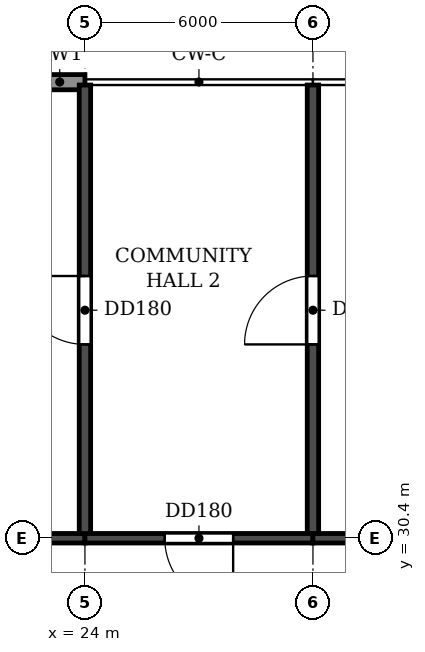
"""IFC4 building model, lengths in metres.
Left out: names, types, materials, properties, quantities, classifications, styles, units other than length and angle.
Written with IfcOpenShell. Run it as: python <this file> out.ifc"""

import sys

from ifc_helpers import new_model, si_unit, direction, frame, frame_2d, origin, place, context, subcontext, project, spatial, rectangle, extrude, element, fill, save


model = new_model("IFC4")
c1 = context("Model", 3, precision=1e-05, world=origin(), true_north=direction((0.0, 1.0)))
c2 = subcontext(c1, "Body", "Model", "MODEL_VIEW")
j1 = project(units=[si_unit("LENGTHUNIT", "METRE"), si_unit("PLANEANGLEUNIT", "RADIAN")], contexts=[c1])
p1 = place(None, origin())
s1 = spatial("IfcSite", under=j1, at=p1, CompositionType="ELEMENT")
p2 = place(p1, origin())
s2 = spatial("IfcBuilding", under=s1, at=p2, CompositionType="ELEMENT")
p3 = place(p2, frame((0.0, 0.0, 158.7)))
s3 = spatial("IfcBuildingStorey", under=s2, at=p3, CompositionType="ELEMENT", Elevation=158.7)
p4 = place(p3, frame((24.0, 30.525, 0.0), z_axis=(0.0, 0.0, 1.0), x_axis=(0.0, 1.0, 0.0)))
e1 = element("IfcWall", 1, at=p4, inside=s3, PredefinedType="SHEAR", context=c2, shape_type="SweptSolid", body=[
    extrude(rectangle(XDim=11.8, YDim=0.3, at=frame_2d((5.9, 0.0))), origin(), (0.0, 0.0, 1.0), 3.07),
])
p5 = place(p4, frame((4.975, 0.0, 0.0)))
e2 = element("IfcOpeningElement", 2, at=p5, cuts=e1, PredefinedType="OPENING", context=c2, shape_type="SweptSolid", body=[
    extrude(rectangle(XDim=1.8, YDim=2.1, at=frame_2d((0.9, 1.05))), frame((0.0, 0.16, 0.0), z_axis=(0.0, -1.0, 0.0), x_axis=(1.0, 0.0, 0.0)), (0.0, 0.0, 1.0), 0.32),
])
p6 = place(p3, frame((30.0, 30.525, 0.0), z_axis=(0.0, 0.0, 1.0), x_axis=(0.0, 1.0, 0.0)))
e3 = element("IfcWall", 3, at=p6, inside=s3, PredefinedType="SHEAR", context=c2, shape_type="SweptSolid", body=[
    extrude(rectangle(XDim=11.8, YDim=0.3, at=frame_2d((5.9, 0.0))), origin(), (0.0, 0.0, 1.0), 3.07),
])
p7 = place(p6, frame((4.975, 0.0, 0.0)))
e4 = element("IfcOpeningElement", 4, at=p7, cuts=e3, PredefinedType="OPENING", context=c2, shape_type="SweptSolid", body=[
    extrude(rectangle(XDim=1.8, YDim=2.1, at=frame_2d((0.9, 1.05))), frame((0.0, 0.16, 0.0), z_axis=(0.0, -1.0, 0.0), x_axis=(1.0, 0.0, 0.0)), (0.0, 0.0, 1.0), 0.32),
])
p8 = place(p3, frame((18.2, 30.4, 0.0), z_axis=(0.0, 0.0, 1.0), x_axis=(1.0, 0.0, 0.0)))
e5 = element("IfcWall", 5, at=p8, inside=s3, PredefinedType="SHEAR", context=c2, shape_type="SweptSolid", body=[
    extrude(rectangle(XDim=5.8, YDim=0.25, at=frame_2d((2.9, 0.0))), origin(), (0.0, 0.0, 1.0), 2.47),
])
p9 = place(p8, frame((1.9, 0.0, 0.0)))
e6 = element("IfcOpeningElement", 6, at=p9, cuts=e5, PredefinedType="OPENING", context=c2, shape_type="SweptSolid", body=[
    extrude(rectangle(XDim=1.8, YDim=2.1, at=frame_2d((0.9, 1.05))), frame((0.0, 0.135, 0.0), z_axis=(0.0, -1.0, 0.0), x_axis=(1.0, 0.0, 0.0)), (0.0, 0.0, 1.0), 0.27),
])
p10 = place(p3, frame((24.0, 30.4, 0.0), z_axis=(0.0, 0.0, 1.0), x_axis=(1.0, 0.0, 0.0)))
e7 = element("IfcWall", 7, at=p10, inside=s3, PredefinedType="SHEAR", context=c2, shape_type="SweptSolid", body=[
    extrude(rectangle(XDim=6.0, YDim=0.25, at=frame_2d((3.0, 0.0))), origin(), (0.0, 0.0, 1.0), 2.47),
])
p11 = place(p10, frame((2.1, 0.0, 0.0)))
e8 = element("IfcOpeningElement", 8, at=p11, cuts=e7, PredefinedType="OPENING", context=c2, shape_type="SweptSolid", body=[
    extrude(rectangle(XDim=1.8, YDim=2.1, at=frame_2d((0.9, 1.05))), frame((0.0, 0.135, 0.0), z_axis=(0.0, -1.0, 0.0), x_axis=(1.0, 0.0, 0.0)), (0.0, 0.0, 1.0), 0.27),
])
p12 = place(p3, frame((30.0, 30.4, 0.0), z_axis=(0.0, 0.0, 1.0), x_axis=(1.0, 0.0, 0.0)))
e9 = element("IfcWall", 9, at=p12, inside=s3, PredefinedType="SHEAR", context=c2, shape_type="SweptSolid", body=[
    extrude(rectangle(XDim=6.0, YDim=0.25, at=frame_2d((3.0, 0.0))), origin(), (0.0, 0.0, 1.0), 2.47),
])
p13 = place(p12, frame((2.1, 0.0, 0.0)))
e10 = element("IfcOpeningElement", 10, at=p13, cuts=e9, PredefinedType="OPENING", context=c2, shape_type="SweptSolid", body=[
    extrude(rectangle(XDim=1.8, YDim=2.1, at=frame_2d((0.9, 1.05))), frame((0.0, 0.135, 0.0), z_axis=(0.0, -1.0, 0.0), x_axis=(1.0, 0.0, 0.0)), (0.0, 0.0, 1.0), 0.27),
])
p14 = place(p3, frame((24.0, 42.4, 0.0), z_axis=(0.0, 0.0, 1.0), x_axis=(-1.0, 0.0, 0.0)))
e11 = element("IfcWall", 11, at=p14, inside=s3, PredefinedType="STANDARD", context=c2, shape_type="SweptSolid", body=[
    extrude(rectangle(XDim=1.317, YDim=0.4, at=frame_2d((0.659, 0.0))), origin(), (0.0, 0.0, 1.0), 3.07),
])
p15 = place(p11, frame((1.8, 0.0, 0.0), z_axis=(0.0, 0.0, 1.0), x_axis=(-1.0, 0.0, 0.0)))
e12 = element("IfcDoor", 12, at=p15, inside=s3, OperationType="DOUBLE_DOOR_SINGLE_SWING", PredefinedType="DOOR", context=c2, shape_type="SweptSolid", body=[
    extrude(rectangle(XDim=1.8, YDim=2.1, at=frame_2d((0.9, 1.05))), frame((0.0, 0.025, 0.0), z_axis=(0.0, -1.0, 0.0), x_axis=(1.0, 0.0, 0.0)), (0.0, 0.0, 1.0), 0.05),
])
fill(e8, e12)
p16 = place(p5, origin())
e13 = element("IfcDoor", 13, at=p16, inside=s3, OperationType="DOUBLE_DOOR_SINGLE_SWING", PredefinedType="DOOR", context=c2, shape_type="SweptSolid", body=[
    extrude(rectangle(XDim=1.8, YDim=2.1, at=frame_2d((0.9, 1.05))), frame((0.0, 0.025, 0.0), z_axis=(0.0, -1.0, 0.0), x_axis=(1.0, 0.0, 0.0)), (0.0, 0.0, 1.0), 0.05),
])
fill(e2, e13)
p17 = place(p7, origin())
e14 = element("IfcDoor", 14, at=p17, inside=s3, OperationType="DOUBLE_DOOR_SINGLE_SWING", PredefinedType="DOOR", context=c2, shape_type="SweptSolid", body=[
    extrude(rectangle(XDim=1.8, YDim=2.1, at=frame_2d((0.9, 1.05))), frame((0.0, 0.025, 0.0), z_axis=(0.0, -1.0, 0.0), x_axis=(1.0, 0.0, 0.0)), (0.0, 0.0, 1.0), 0.05),
])
fill(e4, e14)
save(model, sys.argv[1])
